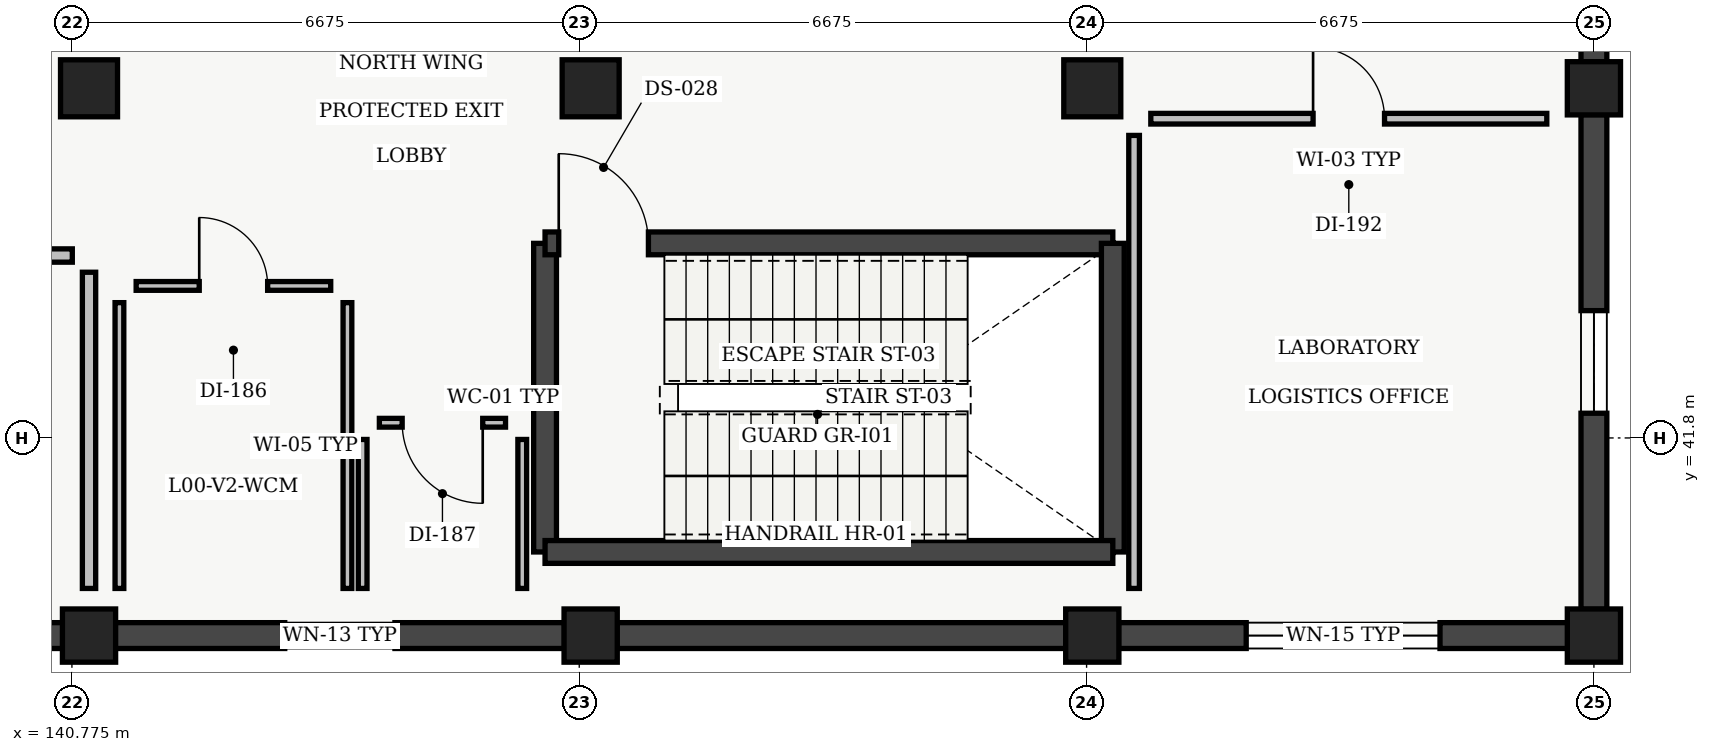
"""IFC4 building model, lengths in metres.
Left out: names, types, materials, properties, quantities, classifications, styles, units other than length and angle.
Written with IfcOpenShell. Run it as: python <this file> out.ifc"""

import sys

from ifc_helpers import new_model, si_unit, direction, frame, frame_2d, origin, origin_2d, place, context, subcontext, project, spatial, rectangle, extrude, element, fill, save


model = new_model("IFC4")
c1 = context("Model", 3, precision=1e-05, world=origin(), true_north=direction((0.0, 1.0)))
c2 = subcontext(c1, "Body", "Model", "MODEL_VIEW")
j1 = project(units=[si_unit("LENGTHUNIT", "METRE"), si_unit("PLANEANGLEUNIT", "RADIAN")], contexts=[c1])
p1 = place(None, origin())
s1 = spatial("IfcSite", under=j1, at=p1, CompositionType="ELEMENT")
p2 = place(p1, origin())
s2 = spatial("IfcBuilding", under=s1, at=p2, CompositionType="ELEMENT")
p3 = place(p2, origin())
s3 = spatial("IfcBuildingStorey", under=s2, at=p3, CompositionType="ELEMENT", Elevation=0.0)
p4 = place(p3, frame((141.0, 39.2, 0.0), z_axis=(0.0, 0.0, 1.0), x_axis=(1.0, 0.0, 0.0)))
e1 = element("IfcColumn", 1, at=p4, inside=s3, PredefinedType="COLUMN", context=c2, shape_type="SweptSolid", body=[
    extrude(rectangle(XDim=0.7, YDim=0.7, at=origin_2d()), origin(), (0.0, 0.0, 1.0), 4.9),
])
p5 = place(p3, frame((141.0, 46.4, 0.0), z_axis=(0.0, 0.0, 1.0), x_axis=(1.0, 0.0, 0.0)))
e2 = element("IfcColumn", 2, at=p5, inside=s3, PredefinedType="COLUMN", context=c2, shape_type="SweptSolid", body=[
    extrude(rectangle(XDim=0.75, YDim=0.75, at=origin_2d()), origin(), (0.0, 0.0, 1.0), 4.9),
])
p6 = place(p3, frame((147.6, 39.2, 0.0), z_axis=(0.0, 0.0, 1.0), x_axis=(1.0, 0.0, 0.0)))
e3 = element("IfcColumn", 3, at=p6, inside=s3, PredefinedType="COLUMN", context=c2, shape_type="SweptSolid", body=[
    extrude(rectangle(XDim=0.7, YDim=0.7, at=origin_2d()), origin(), (0.0, 0.0, 1.0), 4.9),
])
p7 = place(p3, frame((147.6, 46.4, 0.0), z_axis=(0.0, 0.0, 1.0), x_axis=(1.0, 0.0, 0.0)))
e4 = element("IfcColumn", 4, at=p7, inside=s3, PredefinedType="COLUMN", context=c2, shape_type="SweptSolid", body=[
    extrude(rectangle(XDim=0.75, YDim=0.75, at=origin_2d()), origin(), (0.0, 0.0, 1.0), 4.9),
])
p8 = place(p3, frame((154.2, 39.2, 0.0), z_axis=(0.0, 0.0, 1.0), x_axis=(1.0, 0.0, 0.0)))
e5 = element("IfcColumn", 5, at=p8, inside=s3, PredefinedType="COLUMN", context=c2, shape_type="SweptSolid", body=[
    extrude(rectangle(XDim=0.7, YDim=0.7, at=origin_2d()), origin(), (0.0, 0.0, 1.0), 4.9),
])
p9 = place(p3, frame((154.2, 46.4, 0.0), z_axis=(0.0, 0.0, 1.0), x_axis=(1.0, 0.0, 0.0)))
e6 = element("IfcColumn", 6, at=p9, inside=s3, PredefinedType="COLUMN", context=c2, shape_type="SweptSolid", body=[
    extrude(rectangle(XDim=0.75, YDim=0.75, at=origin_2d()), origin(), (0.0, 0.0, 1.0), 4.9),
])
for number, where, z_axis, x_axis in (
    (7, (160.8, 39.2, 0.0), (0.0, 0.0, 1.0), (1.0, 0.0, 0.0)),
    (8, (160.8, 46.4, 0.0), (0.0, 0.0, 1.0), (1.0, 0.0, 0.0)),
):
    element("IfcColumn", number, at=place(p3, frame(where, z_axis=z_axis, x_axis=x_axis)), inside=s3, PredefinedType="COLUMN", context=c2, shape_type="SweptSolid", body=[
        extrude(rectangle(XDim=0.7, YDim=0.7, at=origin_2d()), origin(), (0.0, 0.0, 1.0), 4.9),
    ])
p10 = place(p3, frame((160.8, 53.255, 0.0), z_axis=(0.0, 0.0, 1.0), x_axis=(0.0, -1.0, 0.0)))
e9 = element("IfcWall", 9, at=p10, inside=s3, PredefinedType="SOLIDWALL", context=c2, shape_type="SweptSolid", body=[
    extrude(rectangle(XDim=6.51, YDim=0.34, at=frame_2d((3.255, 0.0))), origin(), (0.0, 0.0, 1.0), 4.435),
])
p11 = place(p10, frame((4.06, 0.0, 0.0)))
e10 = element("IfcOpeningElement", 10, at=p11, cuts=e9, PredefinedType="OPENING", context=c2, shape_type="SweptSolid", body=[
    extrude(rectangle(XDim=2.0, YDim=2.25, at=frame_2d((1.0, 1.125))), frame((0.0, 0.17, 0.0), z_axis=(0.0, -1.0, 0.0), x_axis=(1.0, 0.0, 0.0)), (0.0, 0.0, 1.0), 0.34),
])
p12 = place(p3, frame((160.8, 46.055, 0.0), z_axis=(0.0, 0.0, 1.0), x_axis=(0.0, -1.0, 0.0)))
e11 = element("IfcWall", 11, at=p12, inside=s3, PredefinedType="SOLIDWALL", context=c2, shape_type="SweptSolid", body=[
    extrude(rectangle(XDim=6.51, YDim=0.34, at=frame_2d((3.255, 0.0))), origin(), (0.0, 0.0, 1.0), 4.435),
])
p13 = place(p12, frame((2.58, 0.0, 0.95)))
e12 = element("IfcOpeningElement", 12, at=p13, cuts=e11, PredefinedType="OPENING", context=c2, shape_type="SweptSolid", body=[
    extrude(rectangle(XDim=1.35, YDim=1.8, at=frame_2d((0.675, 0.9))), frame((0.0, 0.17, 0.0), z_axis=(0.0, -1.0, 0.0), x_axis=(1.0, 0.0, 0.0)), (0.0, 0.0, 1.0), 0.34),
])
p14 = place(p3, frame((160.455, 39.2, 0.0), z_axis=(0.0, 0.0, 1.0), x_axis=(-1.0, 0.0, 0.0)))
e13 = element("IfcWall", 13, at=p14, inside=s3, PredefinedType="SOLIDWALL", context=c2, shape_type="SweptSolid", body=[
    extrude(rectangle(XDim=5.91, YDim=0.34, at=frame_2d((2.955, 0.0))), origin(), (0.0, 0.0, 1.0), 4.435),
])
p15 = place(p14, frame((1.68, 0.0, 0.95)))
e14 = element("IfcOpeningElement", 14, at=p15, cuts=e13, PredefinedType="OPENING", context=c2, shape_type="SweptSolid", body=[
    extrude(rectangle(XDim=2.55, YDim=1.75, at=frame_2d((1.275, 0.875))), frame((0.0, 0.17, 0.0), z_axis=(0.0, -1.0, 0.0), x_axis=(1.0, 0.0, 0.0)), (0.0, 0.0, 1.0), 0.34),
])
p16 = place(p3, frame((153.855, 39.2, 0.0), z_axis=(0.0, 0.0, 1.0), x_axis=(-1.0, 0.0, 0.0)))
e15 = element("IfcWall", 15, at=p16, inside=s3, PredefinedType="SOLIDWALL", context=c2, shape_type="SweptSolid", body=[
    extrude(rectangle(XDim=5.91, YDim=0.34, at=frame_2d((2.955, 0.0))), origin(), (0.0, 0.0, 1.0), 4.435),
])
p17 = place(p3, frame((147.255, 39.2, 0.0), z_axis=(0.0, 0.0, 1.0), x_axis=(-1.0, 0.0, 0.0)))
e16 = element("IfcWall", 16, at=p17, inside=s3, PredefinedType="SOLIDWALL", context=c2, shape_type="SweptSolid", body=[
    extrude(rectangle(XDim=5.91, YDim=0.34, at=frame_2d((2.955, 0.0))), origin(), (0.0, 0.0, 1.0), 4.435),
])
p18 = place(p17, frame((2.23, 0.0, 0.95)))
e17 = element("IfcOpeningElement", 17, at=p18, cuts=e16, PredefinedType="OPENING", context=c2, shape_type="SweptSolid", body=[
    extrude(rectangle(XDim=1.45, YDim=1.35, at=frame_2d((0.725, 0.675))), frame((0.0, 0.17, 0.0), z_axis=(0.0, -1.0, 0.0), x_axis=(1.0, 0.0, 0.0)), (0.0, 0.0, 1.0), 0.34),
])
p19 = place(p3, frame((140.655, 39.2, 0.0), z_axis=(0.0, 0.0, 1.0), x_axis=(-1.0, 0.0, 0.0)))
e18 = element("IfcWall", 18, at=p19, inside=s3, PredefinedType="SOLIDWALL", context=c2, shape_type="SweptSolid", body=[
    extrude(rectangle(XDim=5.91, YDim=0.34, at=frame_2d((2.955, 0.0))), origin(), (0.0, 0.0, 1.0), 4.435),
])
p20 = place(p19, frame((1.98, 0.0, 0.95)))
e19 = element("IfcOpeningElement", 19, at=p20, cuts=e18, PredefinedType="OPENING", context=c2, shape_type="SweptSolid", body=[
    extrude(rectangle(XDim=1.95, YDim=1.5, at=frame_2d((0.975, 0.75))), frame((0.0, 0.17, 0.0), z_axis=(0.0, -1.0, 0.0), x_axis=(1.0, 0.0, 0.0)), (0.0, 0.0, 1.0), 0.34),
])
p21 = place(p3, frame((147.0, 40.3, 0.0), z_axis=(0.0, 0.0, 1.0), x_axis=(0.0, 1.0, 0.0)))
e20 = element("IfcWall", 20, at=p21, inside=s3, PredefinedType="SHEAR", context=c2, shape_type="SweptSolid", body=[
    extrude(rectangle(XDim=4.06, YDim=0.3, at=frame_2d((2.03, 0.0))), origin(), (0.0, 0.0, 1.0), 4.88),
])
p22 = place(p3, frame((147.0, 44.36, 0.0), z_axis=(0.0, 0.0, 1.0), x_axis=(1.0, 0.0, 0.0)))
e21 = element("IfcWall", 21, at=p22, inside=s3, PredefinedType="SHEAR", context=c2, shape_type="SweptSolid", body=[
    extrude(rectangle(XDim=7.47, YDim=0.3, at=frame_2d((3.735, 0.0))), origin(), (0.0, 0.0, 1.0), 4.88),
])
p23 = place(p22, frame((0.18, 0.0, 0.0)))
e22 = element("IfcOpeningElement", 22, at=p23, cuts=e21, PredefinedType="OPENING", context=c2, shape_type="SweptSolid", body=[
    extrude(rectangle(XDim=1.18, YDim=2.15, at=frame_2d((0.59, 1.075))), frame((0.0, 0.15, 0.0), z_axis=(0.0, -1.0, 0.0), x_axis=(1.0, 0.0, 0.0)), (0.0, 0.0, 1.0), 0.3),
])
p24 = place(p3, frame((154.47, 44.36, 0.0), z_axis=(0.0, 0.0, 1.0), x_axis=(0.0, -1.0, 0.0)))
e23 = element("IfcWall", 23, at=p24, inside=s3, PredefinedType="SHEAR", context=c2, shape_type="SweptSolid", body=[
    extrude(rectangle(XDim=4.06, YDim=0.3, at=frame_2d((2.03, 0.0))), origin(), (0.0, 0.0, 1.0), 4.88),
])
p25 = place(p3, frame((154.47, 40.3, 0.0), z_axis=(0.0, 0.0, 1.0), x_axis=(-1.0, 0.0, 0.0)))
e24 = element("IfcWall", 24, at=p25, inside=s3, PredefinedType="SHEAR", context=c2, shape_type="SweptSolid", body=[
    extrude(rectangle(XDim=7.47, YDim=0.3, at=frame_2d((3.735, 0.0))), origin(), (0.0, 0.0, 1.0), 4.88),
])
p26 = place(p3, frame((144.4, 39.82, 0.0), z_axis=(0.0, 0.0, 1.0), x_axis=(0.0, 1.0, 0.0)))
e25 = element("IfcWall", 25, at=p26, inside=s3, PredefinedType="PARTITIONING", context=c2, shape_type="SweptSolid", body=[
    extrude(rectangle(XDim=3.76, YDim=0.115, at=frame_2d((1.88, 0.0))), origin(), (0.0, 0.0, 1.0), 4.55),
])
p27 = place(p3, frame((144.18, 43.8, 0.0), z_axis=(0.0, 0.0, 1.0), x_axis=(-1.0, 0.0, 0.0)))
e26 = element("IfcWall", 26, at=p27, inside=s3, PredefinedType="PARTITIONING", context=c2, shape_type="SweptSolid", body=[
    extrude(rectangle(XDim=2.56, YDim=0.115, at=frame_2d((1.28, 0.0))), origin(), (0.0, 0.0, 1.0), 4.55),
])
p28 = place(p27, frame((0.83, 0.0, 0.0)))
e27 = element("IfcOpeningElement", 27, at=p28, cuts=e26, PredefinedType="OPENING", context=c2, shape_type="SweptSolid", body=[
    extrude(rectangle(XDim=0.9, YDim=2.1, at=frame_2d((0.45, 1.05))), frame((0.0, 0.058, 0.0), z_axis=(0.0, -1.0, 0.0), x_axis=(1.0, 0.0, 0.0)), (0.0, 0.0, 1.0), 0.115),
])
p29 = place(p3, frame((141.4, 43.58, 0.0), z_axis=(0.0, 0.0, 1.0), x_axis=(0.0, -1.0, 0.0)))
e28 = element("IfcWall", 28, at=p29, inside=s3, PredefinedType="PARTITIONING", context=c2, shape_type="SweptSolid", body=[
    extrude(rectangle(XDim=3.76, YDim=0.115, at=frame_2d((1.88, 0.0))), origin(), (0.0, 0.0, 1.0), 4.55),
])
p30 = place(p3, frame((146.7, 39.82, 0.0), z_axis=(0.0, 0.0, 1.0), x_axis=(0.0, 1.0, 0.0)))
e29 = element("IfcWall", 29, at=p30, inside=s3, PredefinedType="PARTITIONING", context=c2, shape_type="SweptSolid", body=[
    extrude(rectangle(XDim=1.96, YDim=0.115, at=frame_2d((0.98, 0.0))), origin(), (0.0, 0.0, 1.0), 4.55),
])
p31 = place(p3, frame((146.48, 42.0, 0.0), z_axis=(0.0, 0.0, 1.0), x_axis=(-1.0, 0.0, 0.0)))
e30 = element("IfcWall", 30, at=p31, inside=s3, PredefinedType="PARTITIONING", context=c2, shape_type="SweptSolid", body=[
    extrude(rectangle(XDim=1.66, YDim=0.115, at=frame_2d((0.83, 0.0))), origin(), (0.0, 0.0, 1.0), 4.55),
])
p32 = place(p31, frame((0.3, 0.0, 0.0)))
e31 = element("IfcOpeningElement", 31, at=p32, cuts=e30, PredefinedType="OPENING", context=c2, shape_type="SweptSolid", body=[
    extrude(rectangle(XDim=1.06, YDim=2.12, at=frame_2d((0.53, 1.06))), frame((0.0, 0.058, 0.0), z_axis=(0.0, -1.0, 0.0), x_axis=(1.0, 0.0, 0.0)), (0.0, 0.0, 1.0), 0.115),
])
p33 = place(p3, frame((144.6, 41.78, 0.0), z_axis=(0.0, 0.0, 1.0), x_axis=(0.0, -1.0, 0.0)))
e32 = element("IfcWall", 32, at=p33, inside=s3, PredefinedType="PARTITIONING", context=c2, shape_type="SweptSolid", body=[
    extrude(rectangle(XDim=1.96, YDim=0.115, at=frame_2d((0.98, 0.0))), origin(), (0.0, 0.0, 1.0), 4.55),
])
p34 = place(p3, frame((141.0, 39.82, 0.0), z_axis=(0.0, 0.0, 1.0), x_axis=(0.0, 1.0, 0.0)))
e33 = element("IfcWall", 33, at=p34, inside=s3, PredefinedType="SOLIDWALL", context=c2, shape_type="SweptSolid", body=[
    extrude(rectangle(XDim=4.16, YDim=0.175, at=frame_2d((2.08, 0.0))), origin(), (0.0, 0.0, 1.0), 4.235),
])
p35 = place(p3, frame((140.78, 44.2, 0.0), z_axis=(0.0, 0.0, 1.0), x_axis=(-1.0, 0.0, 0.0)))
e34 = element("IfcWall", 34, at=p35, inside=s3, PredefinedType="SOLIDWALL", context=c2, shape_type="SweptSolid", body=[
    extrude(rectangle(XDim=12.76, YDim=0.175, at=frame_2d((6.38, 0.0))), origin(), (0.0, 0.0, 1.0), 4.485),
])
p36 = place(p35, frame((5.56, 0.0, 0.0)))
e35 = element("IfcOpeningElement", 35, at=p36, cuts=e34, PredefinedType="OPENING", context=c2, shape_type="SweptSolid", body=[
    extrude(rectangle(XDim=1.64, YDim=2.2, at=frame_2d((0.82, 1.1))), frame((0.0, 0.087, 0.0), z_axis=(0.0, -1.0, 0.0), x_axis=(1.0, 0.0, 0.0)), (0.0, 0.0, 1.0), 0.175),
])
p37 = place(p3, frame((160.18, 46.0, 0.0), z_axis=(0.0, 0.0, 1.0), x_axis=(-1.0, 0.0, 0.0)))
e36 = element("IfcWall", 36, at=p37, inside=s3, PredefinedType="PARTITIONING", context=c2, shape_type="SweptSolid", body=[
    extrude(rectangle(XDim=5.21, YDim=0.14, at=frame_2d((2.605, 0.0))), origin(), (0.0, 0.0, 1.0), 4.55),
])
p38 = place(p37, frame((2.135, 0.0, 0.0)))
e37 = element("IfcOpeningElement", 37, at=p38, cuts=e36, PredefinedType="OPENING", context=c2, shape_type="SweptSolid", body=[
    extrude(rectangle(XDim=0.94, YDim=2.12, at=frame_2d((0.47, 1.06))), frame((0.0, 0.07, 0.0), z_axis=(0.0, -1.0, 0.0), x_axis=(1.0, 0.0, 0.0)), (0.0, 0.0, 1.0), 0.14),
])
p39 = place(p3, frame((154.75, 45.78, 0.0), z_axis=(0.0, 0.0, 1.0), x_axis=(0.0, -1.0, 0.0)))
e38 = element("IfcWall", 38, at=p39, inside=s3, PredefinedType="PARTITIONING", context=c2, shape_type="SweptSolid", body=[
    extrude(rectangle(XDim=5.96, YDim=0.14, at=frame_2d((2.98, 0.0))), origin(), (0.0, 0.0, 1.0), 4.55),
])
p40 = place(p13, origin())
e39 = element("IfcWindow", 39, at=p40, inside=s3, PartitioningType="SINGLE_PANEL", PredefinedType="WINDOW", context=c2, shape_type="SweptSolid", body=[
    extrude(rectangle(XDim=1.35, YDim=1.8, at=frame_2d((0.675, 0.9))), frame((0.0, 0.03, 0.0), z_axis=(0.0, -1.0, 0.0), x_axis=(1.0, 0.0, 0.0)), (0.0, 0.0, 1.0), 0.06),
])
fill(e12, e39)
p41 = place(p15, origin())
e40 = element("IfcWindow", 40, at=p41, inside=s3, PartitioningType="SINGLE_PANEL", PredefinedType="WINDOW", context=c2, shape_type="SweptSolid", body=[
    extrude(rectangle(XDim=2.55, YDim=1.75, at=frame_2d((1.275, 0.875))), frame((0.0, 0.03, 0.0), z_axis=(0.0, -1.0, 0.0), x_axis=(1.0, 0.0, 0.0)), (0.0, 0.0, 1.0), 0.06),
])
fill(e14, e40)
p42 = place(p18, origin())
e41 = element("IfcWindow", 41, at=p42, inside=s3, PartitioningType="SINGLE_PANEL", PredefinedType="WINDOW", context=c2, shape_type="SweptSolid", body=[
    extrude(rectangle(XDim=1.45, YDim=1.35, at=frame_2d((0.725, 0.675))), frame((0.0, 0.03, 0.0), z_axis=(0.0, -1.0, 0.0), x_axis=(1.0, 0.0, 0.0)), (0.0, 0.0, 1.0), 0.06),
])
fill(e17, e41)
p43 = place(p23, origin())
e42 = element("IfcDoor", 42, at=p43, inside=s3, OperationType="SINGLE_SWING_LEFT", PredefinedType="DOOR", context=c2, shape_type="SweptSolid", body=[
    extrude(rectangle(XDim=1.18, YDim=2.15, at=frame_2d((0.59, 1.075))), frame((0.0, 0.025, 0.0), z_axis=(0.0, -1.0, 0.0), x_axis=(1.0, 0.0, 0.0)), (0.0, 0.0, 1.0), 0.05),
])
fill(e22, e42)
p44 = place(p28, origin())
e43 = element("IfcDoor", 43, at=p44, inside=s3, OperationType="SINGLE_SWING_RIGHT", PredefinedType="DOOR", context=c2, shape_type="SweptSolid", body=[
    extrude(rectangle(XDim=0.9, YDim=2.1, at=frame_2d((0.45, 1.05))), frame((0.0, 0.025, 0.0), z_axis=(0.0, -1.0, 0.0), x_axis=(1.0, 0.0, 0.0)), (0.0, 0.0, 1.0), 0.05),
])
fill(e27, e43)
p45 = place(p32, origin())
e44 = element("IfcDoor", 44, at=p45, inside=s3, OperationType="SINGLE_SWING_LEFT", PredefinedType="DOOR", context=c2, shape_type="SweptSolid", body=[
    extrude(rectangle(XDim=1.06, YDim=2.12, at=frame_2d((0.53, 1.06))), frame((0.0, 0.025, 0.0), z_axis=(0.0, -1.0, 0.0), x_axis=(1.0, 0.0, 0.0)), (0.0, 0.0, 1.0), 0.05),
])
fill(e31, e44)
p46 = place(p38, origin())
e45 = element("IfcDoor", 45, at=p46, inside=s3, OperationType="SINGLE_SWING_RIGHT", PredefinedType="DOOR", context=c2, shape_type="SweptSolid", body=[
    extrude(rectangle(XDim=0.94, YDim=2.12, at=frame_2d((0.47, 1.06))), frame((0.0, 0.025, 0.0), z_axis=(0.0, -1.0, 0.0), x_axis=(1.0, 0.0, 0.0)), (0.0, 0.0, 1.0), 0.05),
])
fill(e37, e45)
save(model, sys.argv[1])
